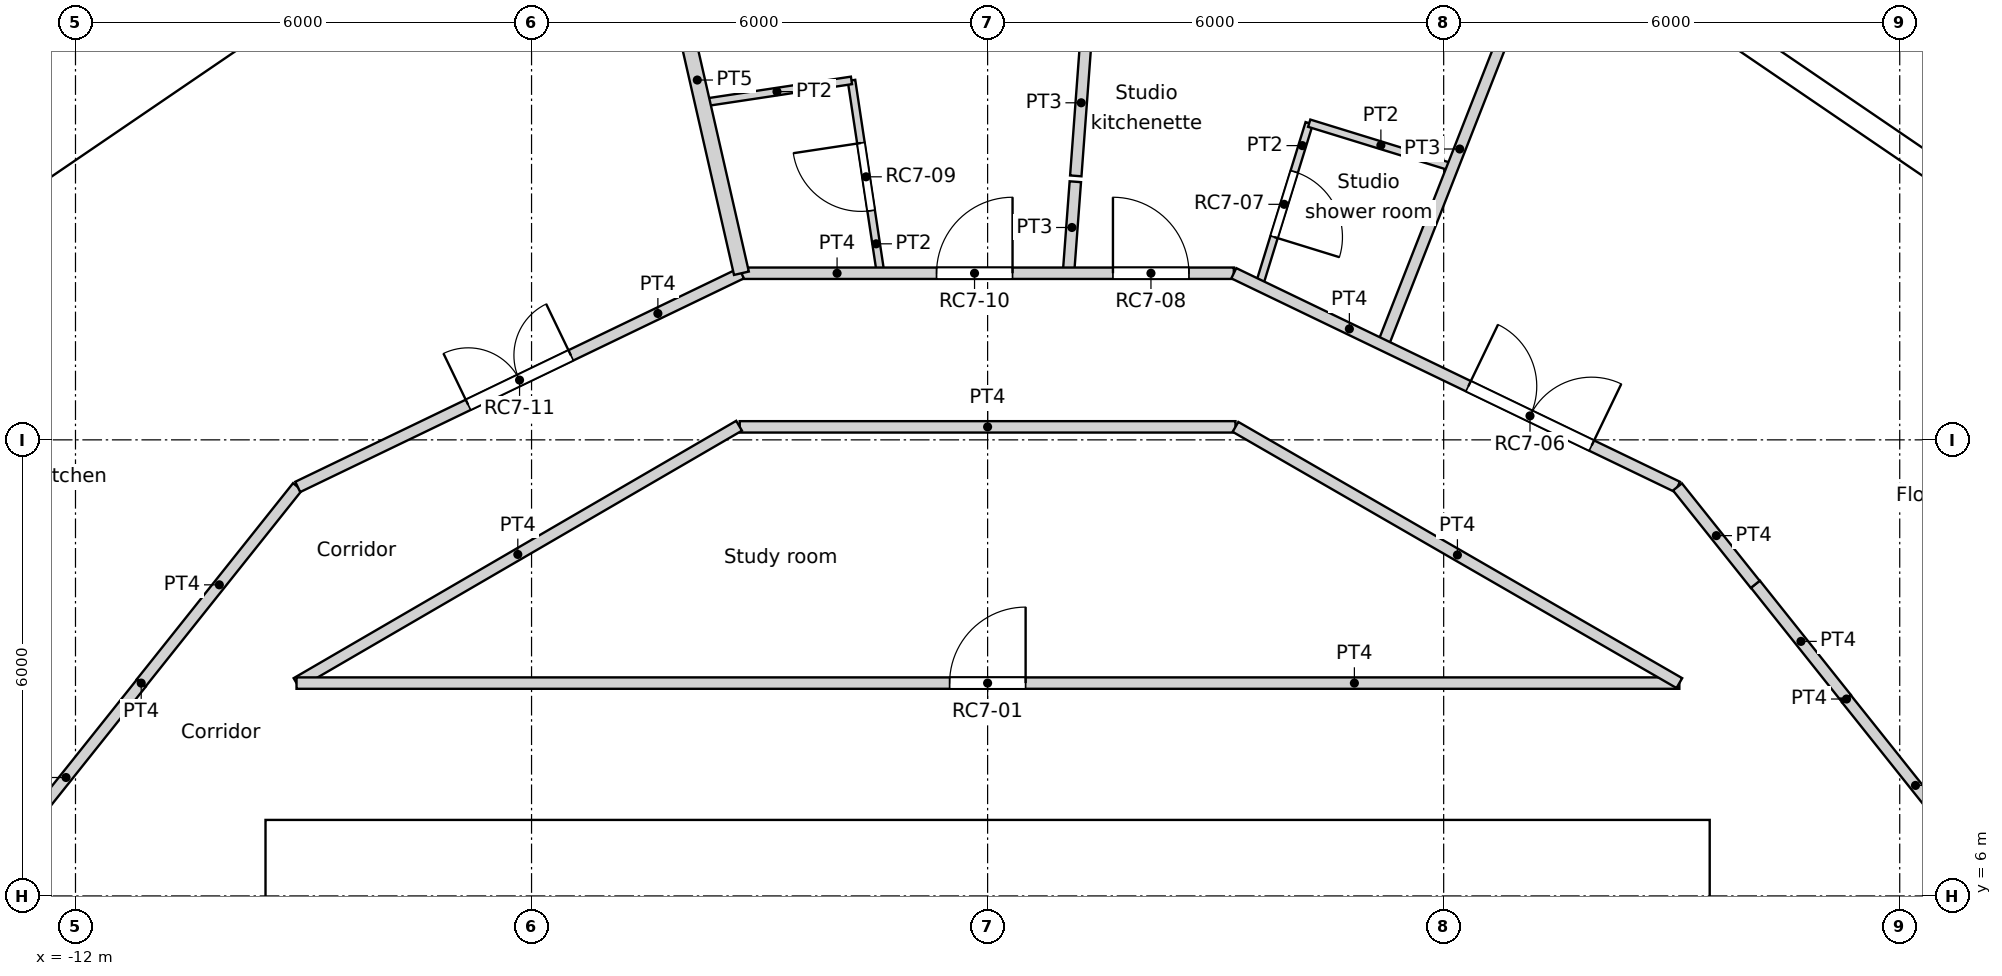
"""IFC4 building model, lengths in metres.
Left out: names, types, materials, properties, quantities, classifications, styles, units other than length and angle.
Written with IfcOpenShell. Run it as: python <this file> out.ifc"""

import sys

from ifc_helpers import new_model, si_unit, direction, frame, frame_2d, origin, origin_2d, place, context, subcontext, project, spatial, rectangle, circle, extrude, element, fill, save


model = new_model("IFC4")
c1 = context("Model", 3, precision=1e-05, world=origin(), true_north=direction((0.0, 1.0)))
c2 = subcontext(c1, "Body", "Model", "MODEL_VIEW")
j1 = project(units=[si_unit("LENGTHUNIT", "METRE"), si_unit("PLANEANGLEUNIT", "RADIAN")], contexts=[c1])
p1 = place(None, origin())
s1 = spatial("IfcSite", under=j1, at=p1, CompositionType="ELEMENT")
p2 = place(p1, origin())
s2 = spatial("IfcBuilding", under=s1, at=p2, CompositionType="ELEMENT")
p3 = place(p2, frame((0.0, 0.0, 294.6)))
s3 = spatial("IfcBuildingStorey", under=s2, at=p3, CompositionType="ELEMENT", Elevation=294.6)
for number, where, z_axis, x_axis in (
    (1, (11.735, 14.716, 0.0), (0.0, 0.0, 1.0), (1.0, 0.0, 0.0)),
    (2, (6.876, 17.521, 0.0), (0.0, 0.0, 1.0), (1.0, 0.0, 0.0)),
    (3, (-9.411, 16.301, 0.0), (0.0, 0.0, 1.0), (1.0, 0.0, 0.0)),
):
    element("IfcColumn", number, at=place(p3, frame(where, z_axis=z_axis, x_axis=x_axis)), inside=s3, PredefinedType="COLUMN", context=c2, shape_type="SweptSolid", body=[
        extrude(circle(Radius=0.45, at=origin_2d()), origin(), (0.0, 0.0, 1.0), 3.6),
    ])
p4 = place(p3, frame((12.408, 15.584, 0.0), z_axis=(0.0, 0.0, 1.0), x_axis=(-0.826236061068, 0.563324037646, 0.0)))
e4 = element("IfcWall", 4, at=p4, inside=s3, PredefinedType="SOLIDWALL", context=c2, shape_type="SweptSolid", body=[
    extrude(rectangle(XDim=2.962, YDim=0.3, at=frame_2d((1.481, 0.0))), origin(), (0.0, 0.0, 1.0), 3.25),
])
p5 = place(p4, frame((1.481, 0.0, 1.55)))
e5 = element("IfcOpeningElement", 5, at=p5, cuts=e4, PredefinedType="OPENING", context=c2, shape_type="SweptSolid", body=[
    extrude(circle(Radius=0.9, at=origin_2d()), frame((0.0, 0.16, 0.0), z_axis=(0.0, -1.0, 0.0), x_axis=(1.0, 0.0, 0.0)), (0.0, 0.0, 1.0), 0.32),
])
p6 = place(p3, frame((-10.275, 17.734, -0.35), z_axis=(0.0, 0.0, 1.0), x_axis=(-0.826246281157, -0.563309047392, 0.0)))
e6 = element("IfcWall", 6, at=p6, inside=s3, PredefinedType="ELEMENTEDWALL", context=c2, shape_type="SweptSolid", body=[
    extrude(rectangle(XDim=3.0, YDim=1.45, at=frame_2d((1.5, 0.0))), origin(), (0.0, 0.0, 1.0), 3.6),
])
p7 = place(p6, frame((1.5, 0.0, 1.9)))
e7 = element("IfcOpeningElement", 7, at=p7, cuts=e6, PredefinedType="OPENING", context=c2, shape_type="SweptSolid", body=[
    extrude(circle(Radius=0.9, at=origin_2d()), frame((0.0, 0.735, 0.0), z_axis=(0.0, -1.0, 0.0), x_axis=(1.0, 0.0, 0.0)), (0.0, 0.0, 1.0), 1.47),
])
p8 = place(p3, frame((-9.5, 6.7, 0.0), z_axis=(0.0, 0.0, 1.0), x_axis=(1.0, 0.0, 0.0)))
e8 = element("IfcWall", 8, at=p8, inside=s3, PredefinedType="SOLIDWALL", context=c2, shape_type="SweptSolid", body=[
    extrude(rectangle(XDim=19.0, YDim=0.6, at=frame_2d((9.5, 0.0))), origin(), (0.0, 0.0, 1.0), 3.6),
])
p9 = place(p8, frame((5.35, 0.0, 0.0)))
e9 = element("IfcOpeningElement", 9, at=p9, cuts=e8, PredefinedType="OPENING", context=c2, shape_type="SweptSolid", body=[
    extrude(rectangle(XDim=1.7, YDim=2.1, at=frame_2d((0.85, 1.05))), frame((0.0, 0.3, 0.0), z_axis=(0.0, -1.0, 0.0), x_axis=(1.0, 0.0, 0.0)), (0.0, 0.0, 1.0), 0.6),
])
p10 = place(p3, frame((-9.2, -6.4, 0.0), z_axis=(0.0, 0.0, 1.0), x_axis=(0.0, 1.0, 0.0)))
e10 = element("IfcWall", 10, at=p10, inside=s3, PredefinedType="SOLIDWALL", context=c2, shape_type="SweptSolid", body=[
    extrude(rectangle(XDim=12.8, YDim=0.6, at=frame_2d((6.4, 0.0))), origin(), (0.0, 0.0, 1.0), 3.6),
])
p11 = place(p3, frame((9.2, -6.4, 0.0), z_axis=(0.0, 0.0, 1.0), x_axis=(0.0, 1.0, 0.0)))
e11 = element("IfcWall", 11, at=p11, inside=s3, PredefinedType="SOLIDWALL", context=c2, shape_type="SweptSolid", body=[
    extrude(rectangle(XDim=12.8, YDim=0.6, at=frame_2d((6.4, 0.0))), origin(), (0.0, 0.0, 1.0), 3.6),
])
p12 = place(p11, frame((6.4, 0.0, 0.0)))
e12 = element("IfcOpeningElement", 12, at=p12, cuts=e11, PredefinedType="OPENING", context=c2, shape_type="SweptSolid", body=[
    extrude(rectangle(XDim=1.8, YDim=2.1, at=frame_2d((0.9, 1.05))), frame((0.0, 0.3, 0.0), z_axis=(0.0, -1.0, 0.0), x_axis=(1.0, 0.0, 0.0)), (0.0, 0.0, 1.0), 0.6),
])
for number, where, z_axis, x_axis in (
    (13, (-2.25, 3.25, 0.0), (0.0, 0.0, 1.0), (0.0, 1.0, 0.0)),
    (14, (0.55, 3.25, 0.0), (0.0, 0.0, 1.0), (0.0, 1.0, 0.0)),
    (15, (3.35, 3.25, 0.0), (0.0, 0.0, 1.0), (0.0, 1.0, 0.0)),
    (16, (6.15, 3.25, 0.0), (0.0, 0.0, 1.0), (0.0, 1.0, 0.0)),
):
    element("IfcWall", number, at=place(p3, frame(where, z_axis=z_axis, x_axis=x_axis)), inside=s3, PredefinedType="SOLIDWALL", context=c2, shape_type="SweptSolid", body=[
        extrude(rectangle(XDim=3.15, YDim=0.3, at=frame_2d((1.575, 0.0))), origin(), (0.0, 0.0, 1.0), 3.25),
    ])
p13 = place(p3, frame((-9.092, 8.8, 0.0), z_axis=(0.0, 0.0, 1.0), x_axis=(0.864470922103, 0.502682827277, 0.0)))
e17 = element("IfcWall", 17, at=p13, inside=s3, PredefinedType="PARTITIONING", context=c2, shape_type="SweptSolid", body=[
    extrude(rectangle(XDim=6.735, YDim=0.15, at=frame_2d((3.368, 0.0))), origin(), (0.0, 0.0, 1.0), 3.25),
])
p14 = place(p3, frame((-9.092, 8.8, 0.0), z_axis=(0.0, 0.0, 1.0), x_axis=(1.0, 0.0, 0.0)))
e18 = element("IfcWall", 18, at=p14, inside=s3, PredefinedType="PARTITIONING", context=c2, shape_type="SweptSolid", body=[
    extrude(rectangle(XDim=18.193, YDim=0.15, at=frame_2d((9.096, 0.0))), origin(), (0.0, 0.0, 1.0), 3.25),
])
p15 = place(p14, frame((8.592, 0.0, 0.0)))
e19 = element("IfcOpeningElement", 19, at=p15, cuts=e18, PredefinedType="OPENING", context=c2, shape_type="SweptSolid", body=[
    extrude(rectangle(XDim=1.0, YDim=2.04, at=frame_2d((0.5, 1.02))), frame((0.0, 0.075, 0.0), z_axis=(0.0, -1.0, 0.0), x_axis=(1.0, 0.0, 0.0)), (0.0, 0.0, 1.0), 0.15),
])
p16 = place(p3, frame((10.101, 10.101, 0.0), z_axis=(0.0, 0.0, 1.0), x_axis=(0.623130947784, -0.782117524362, 0.0)))
e20 = element("IfcWall", 20, at=p16, inside=s3, PredefinedType="PARTITIONING", context=c2, shape_type="SweptSolid", body=[
    extrude(rectangle(XDim=1.924, YDim=0.15, at=frame_2d((0.962, 0.0))), origin(), (0.0, 0.0, 1.0), 3.25),
])
p17 = place(p3, frame((11.3, 8.585, 0.0), z_axis=(0.0, 0.0, 1.0), x_axis=(0.0, 1.0, 0.0)))
e21 = element("IfcWall", 21, at=p17, inside=s3, PredefinedType="PARTITIONING", context=c2, shape_type="SweptSolid", body=[
    extrude(rectangle(XDim=0.011, YDim=0.15, at=frame_2d((0.006, 0.0))), origin(), (0.0, 0.0, 1.0), 3.25),
])
p18 = place(p3, frame((-11.134, 8.8, 0.0), z_axis=(0.0, 0.0, 1.0), x_axis=(-1.0, 0.0, 0.0)))
e22 = element("IfcWall", 22, at=p18, inside=s3, PredefinedType="PARTITIONING", context=c2, shape_type="SweptSolid", body=[
    extrude(rectangle(XDim=0.003, YDim=0.15, at=frame_2d((0.001, 0.0))), origin(), (0.0, 0.0, 1.0), 3.25),
])
p19 = place(p3, frame((-11.136, 8.802, 0.0), z_axis=(0.0, 0.0, 1.0), x_axis=(0.623151397235, 0.782101231379, 0.0)))
e23 = element("IfcWall", 23, at=p19, inside=s3, PredefinedType="PARTITIONING", context=c2, shape_type="SweptSolid", body=[
    extrude(rectangle(XDim=3.301, YDim=0.15, at=frame_2d((1.65, 0.0))), origin(), (0.0, 0.0, 1.0), 3.25),
])
p20 = place(p3, frame((11.3, 8.592, 0.0), z_axis=(0.0, 0.0, 1.0), x_axis=(0.623446514299, -0.781866001185, 0.0)))
e24 = element("IfcWall", 24, at=p20, inside=s3, PredefinedType="PARTITIONING", context=c2, shape_type="SweptSolid", body=[
    extrude(rectangle(XDim=2.911, YDim=0.15, at=frame_2d((1.456, 0.0))), origin(), (0.0, 0.0, 1.0), 3.25),
])
p21 = place(p3, frame((3.261, 12.171, 0.0), z_axis=(0.0, 0.0, 1.0), x_axis=(0.866066809554, -0.499928276245, 0.0)))
e25 = element("IfcWall", 25, at=p21, inside=s3, PredefinedType="PARTITIONING", context=c2, shape_type="SweptSolid", body=[
    extrude(rectangle(XDim=6.743, YDim=0.15, at=frame_2d((3.371, 0.0))), origin(), (0.0, 0.0, 1.0), 3.25),
])
p22 = place(p3, frame((-3.261, 12.171, 0.0), z_axis=(0.0, 0.0, 1.0), x_axis=(1.0, 0.0, 0.0)))
e26 = element("IfcWall", 26, at=p22, inside=s3, PredefinedType="PARTITIONING", context=c2, shape_type="SweptSolid", body=[
    extrude(rectangle(XDim=6.522, YDim=0.15, at=frame_2d((3.261, 0.0))), origin(), (0.0, 0.0, 1.0), 3.25),
])
p23 = place(p3, frame((3.239, 14.192, 0.0), z_axis=(0.0, 0.0, 1.0), x_axis=(0.900976027191, -0.433868872388, 0.0)))
e27 = element("IfcWall", 27, at=p23, inside=s3, PredefinedType="PARTITIONING", context=c2, shape_type="SweptSolid", body=[
    extrude(rectangle(XDim=6.479, YDim=0.15, at=frame_2d((3.239, 0.0))), origin(), (0.0, 0.0, 1.0), 3.25),
])
p24 = place(p23, frame((3.425, 0.0, 0.0)))
e28 = element("IfcOpeningElement", 28, at=p24, cuts=e27, PredefinedType="OPENING", context=c2, shape_type="SweptSolid", body=[
    extrude(rectangle(XDim=1.8, YDim=2.1, at=frame_2d((0.9, 1.05))), frame((0.0, 0.075, 0.0), z_axis=(0.0, -1.0, 0.0), x_axis=(1.0, 0.0, 0.0)), (0.0, 0.0, 1.0), 0.15),
])
p25 = place(p3, frame((9.076, 11.381, 0.0), z_axis=(0.0, 0.0, 1.0), x_axis=(0.623805208652, -0.781579849829, 0.0)))
e29 = element("IfcWall", 29, at=p25, inside=s3, PredefinedType="PARTITIONING", context=c2, shape_type="SweptSolid", body=[
    extrude(rectangle(XDim=1.64, YDim=0.15, at=frame_2d((0.82, 0.0))), origin(), (0.0, 0.0, 1.0), 3.25),
])
p26 = place(p3, frame((-3.239, 14.192, 0.0), z_axis=(0.0, 0.0, 1.0), x_axis=(1.0, 0.0, 0.0)))
e30 = element("IfcWall", 30, at=p26, inside=s3, PredefinedType="PARTITIONING", context=c2, shape_type="SweptSolid", body=[
    extrude(rectangle(XDim=6.478, YDim=0.15, at=frame_2d((3.239, 0.0))), origin(), (0.0, 0.0, 1.0), 3.25),
])
p27 = place(p26, frame((4.888, 0.0, 0.0)))
e31 = element("IfcOpeningElement", 31, at=p27, cuts=e30, PredefinedType="OPENING", context=c2, shape_type="SweptSolid", body=[
    extrude(rectangle(XDim=1.0, YDim=2.1, at=frame_2d((0.5, 1.05))), frame((0.0, 0.075, 0.0), z_axis=(0.0, -1.0, 0.0), x_axis=(1.0, 0.0, 0.0)), (0.0, 0.0, 1.0), 0.15),
])
p28 = place(p26, frame((2.567, 0.0, 0.0)))
e32 = element("IfcOpeningElement", 32, at=p28, cuts=e30, PredefinedType="OPENING", context=c2, shape_type="SweptSolid", body=[
    extrude(rectangle(XDim=1.0, YDim=2.1, at=frame_2d((0.5, 1.05))), frame((0.0, 0.075, 0.0), z_axis=(0.0, -1.0, 0.0), x_axis=(1.0, 0.0, 0.0)), (0.0, 0.0, 1.0), 0.15),
])
p29 = place(p3, frame((-9.076, 11.381, 0.0), z_axis=(0.0, 0.0, 1.0), x_axis=(0.900976027191, 0.433868872388, 0.0)))
e33 = element("IfcWall", 33, at=p29, inside=s3, PredefinedType="PARTITIONING", context=c2, shape_type="SweptSolid", body=[
    extrude(rectangle(XDim=6.479, YDim=0.15, at=frame_2d((3.239, 0.0))), origin(), (0.0, 0.0, 1.0), 3.25),
])
p30 = place(p29, frame((2.489, 0.0, 0.0)))
e34 = element("IfcOpeningElement", 34, at=p30, cuts=e33, PredefinedType="OPENING", context=c2, shape_type="SweptSolid", body=[
    extrude(rectangle(XDim=1.5, YDim=2.1, at=frame_2d((0.75, 1.05))), frame((0.0, 0.075, 0.0), z_axis=(0.0, -1.0, 0.0), x_axis=(1.0, 0.0, 0.0)), (0.0, 0.0, 1.0), 0.15),
])
p31 = place(p3, frame((-13.115, 6.316, 0.0), z_axis=(0.0, 0.0, 1.0), x_axis=(0.623476099415, 0.781842409606, 0.0)))
e35 = element("IfcWall", 35, at=p31, inside=s3, PredefinedType="PARTITIONING", context=c2, shape_type="SweptSolid", body=[
    extrude(rectangle(XDim=3.177, YDim=0.15, at=frame_2d((1.589, 0.0))), origin(), (0.0, 0.0, 1.0), 3.25),
])
p32 = place(p3, frame((5.2, 13.248, 0.0), z_axis=(0.0, 0.0, 1.0), x_axis=(0.365205108582, 0.930927080209, 0.0)))
e36 = element("IfcWall", 36, at=p32, inside=s3, PredefinedType="PARTITIONING", context=c2, shape_type="SweptSolid", body=[
    extrude(rectangle(XDim=5.54, YDim=0.15, at=frame_2d((2.77, 0.0))), origin(), (0.0, 0.0, 1.0), 3.25),
])
p33 = place(p3, frame((4.231, 16.166, 0.0), z_axis=(0.0, 0.0, 1.0), x_axis=(0.955671951668, -0.294433559219, 0.0)))
e37 = element("IfcWall", 37, at=p33, inside=s3, PredefinedType="PARTITIONING", context=c2, shape_type="SweptSolid", body=[
    extrude(rectangle(XDim=1.973, YDim=0.1, at=frame_2d((0.987, 0.0))), origin(), (0.0, 0.0, 1.0), 3.25),
])
p34 = place(p3, frame((3.572, 14.032, 0.0), z_axis=(0.0, 0.0, 1.0), x_axis=(0.295030507093, 0.955487833457, 0.0)))
e38 = element("IfcWall", 38, at=p34, inside=s3, PredefinedType="PARTITIONING", context=c2, shape_type="SweptSolid", body=[
    extrude(rectangle(XDim=2.233, YDim=0.1, at=frame_2d((1.117, 0.0))), origin(), (0.0, 0.0, 1.0), 3.25),
])
p35 = place(p34, frame((0.667, 0.0, 0.0)))
e39 = element("IfcOpeningElement", 39, at=p35, cuts=e38, PredefinedType="OPENING", context=c2, shape_type="SweptSolid", body=[
    extrude(rectangle(XDim=0.9, YDim=2.04, at=frame_2d((0.45, 1.02))), frame((0.0, 0.05, 0.0), z_axis=(0.0, -1.0, 0.0), x_axis=(1.0, 0.0, 0.0)), (0.0, 0.0, 1.0), 0.1),
])
p36 = place(p3, frame((1.064, 14.192, 0.0), z_axis=(0.0, 0.0, 1.0), x_axis=(0.074608991733, 0.997212865116, 0.0)))
e40 = element("IfcWall", 40, at=p36, inside=s3, PredefinedType="PARTITIONING", context=c2, shape_type="SweptSolid", body=[
    extrude(rectangle(XDim=1.208, YDim=0.15, at=frame_2d((0.604, 0.0))), origin(), (0.0, 0.0, 1.0), 3.25),
])
p37 = place(p3, frame((1.16, 15.473, 0.0), z_axis=(0.0, 0.0, 1.0), x_axis=(0.074188791375, 0.99724421444, 0.0)))
e41 = element("IfcWall", 41, at=p37, inside=s3, PredefinedType="PARTITIONING", context=c2, shape_type="SweptSolid", body=[
    extrude(rectangle(XDim=1.928, YDim=0.15, at=frame_2d((0.964, 0.0))), origin(), (0.0, 0.0, 1.0), 3.25),
])
p38 = place(p3, frame((-1.791, 16.729, 0.0), z_axis=(0.0, 0.0, 1.0), x_axis=(0.149289553133, -0.988793522089, 0.0)))
e42 = element("IfcWall", 42, at=p38, inside=s3, PredefinedType="PARTITIONING", context=c2, shape_type="SweptSolid", body=[
    extrude(rectangle(XDim=2.566, YDim=0.1, at=frame_2d((1.283, 0.0))), origin(), (0.0, 0.0, 1.0), 3.25),
])
p39 = place(p38, frame((0.833, 0.0, 0.0)))
e43 = element("IfcOpeningElement", 43, at=p39, cuts=e42, PredefinedType="OPENING", context=c2, shape_type="SweptSolid", body=[
    extrude(rectangle(XDim=0.9, YDim=2.04, at=frame_2d((0.45, 1.02))), frame((0.0, 0.05, 0.0), z_axis=(0.0, -1.0, 0.0), x_axis=(1.0, 0.0, 0.0)), (0.0, 0.0, 1.0), 0.1),
])
p40 = place(p3, frame((-3.751, 16.434, 0.0), z_axis=(0.0, 0.0, 1.0), x_axis=(0.988867580828, 0.148798210967, 0.0)))
e44 = element("IfcWall", 44, at=p40, inside=s3, PredefinedType="PARTITIONING", context=c2, shape_type="SweptSolid", body=[
    extrude(rectangle(XDim=1.982, YDim=0.1, at=frame_2d((0.991, 0.0))), origin(), (0.0, 0.0, 1.0), 3.25),
])
p41 = place(p3, frame((-4.4, 19.276, 0.0), z_axis=(0.0, 0.0, 1.0), x_axis=(0.222612505682, -0.974907007008, 0.0)))
e45 = element("IfcWall", 45, at=p41, inside=s3, PredefinedType="PARTITIONING", context=c2, shape_type="SweptSolid", body=[
    extrude(rectangle(XDim=5.215, YDim=0.2, at=frame_2d((2.607, 0.0))), origin(), (0.0, 0.0, 1.0), 3.25),
])
p42 = place(p5, origin())
e46 = element("IfcWindow", 46, at=p42, inside=s3, PartitioningType="SINGLE_PANEL", PredefinedType="WINDOW", context=c2, shape_type="SweptSolid", body=[
    extrude(circle(Radius=0.9, at=origin_2d()), frame((0.0, 0.12, 0.0), z_axis=(0.0, -1.0, 0.0), x_axis=(1.0, 0.0, 0.0)), (0.0, 0.0, 1.0), 0.1),
])
fill(e5, e46)
p43 = place(p7, origin())
e47 = element("IfcWindow", 47, at=p43, inside=s3, PartitioningType="SINGLE_PANEL", PredefinedType="WINDOW", context=c2, shape_type="SweptSolid", body=[
    extrude(circle(Radius=0.9, at=origin_2d()), frame((0.0, 0.695, 0.0), z_axis=(0.0, -1.0, 0.0), x_axis=(1.0, 0.0, 0.0)), (0.0, 0.0, 1.0), 0.1),
])
fill(e7, e47)
p44 = place(p9, origin())
e48 = element("IfcDoor", 48, at=p44, inside=s3, OperationType="DOUBLE_DOOR_SINGLE_SWING", PredefinedType="DOOR", context=c2, shape_type="SweptSolid", body=[
    extrude(rectangle(XDim=1.7, YDim=2.1, at=frame_2d((0.85, 1.05))), frame((0.0, 0.025, 0.0), z_axis=(0.0, -1.0, 0.0), x_axis=(1.0, 0.0, 0.0)), (0.0, 0.0, 1.0), 0.05),
])
fill(e9, e48)
p45 = place(p15, origin())
e49 = element("IfcDoor", 49, at=p45, inside=s3, OperationType="SINGLE_SWING_RIGHT", PredefinedType="DOOR", context=c2, shape_type="SweptSolid", body=[
    extrude(rectangle(XDim=1.0, YDim=2.04, at=frame_2d((0.5, 1.02))), frame((0.0, 0.025, 0.0), z_axis=(0.0, -1.0, 0.0), x_axis=(1.0, 0.0, 0.0)), (0.0, 0.0, 1.0), 0.05),
])
fill(e19, e49)
p46 = place(p24, origin())
e50 = element("IfcDoor", 50, at=p46, inside=s3, OperationType="DOUBLE_DOOR_SINGLE_SWING", PredefinedType="DOOR", context=c2, shape_type="SweptSolid", body=[
    extrude(rectangle(XDim=1.8, YDim=2.1, at=frame_2d((0.9, 1.05))), frame((0.0, 0.025, 0.0), z_axis=(0.0, -1.0, 0.0), x_axis=(1.0, 0.0, 0.0)), (0.0, 0.0, 1.0), 0.05),
])
fill(e28, e50)
p47 = place(p35, origin())
e51 = element("IfcDoor", 51, at=p47, inside=s3, OperationType="SINGLE_SWING_RIGHT", PredefinedType="DOOR", context=c2, shape_type="SweptSolid", body=[
    extrude(rectangle(XDim=0.9, YDim=2.04, at=frame_2d((0.45, 1.02))), frame((0.0, 0.025, 0.0), z_axis=(0.0, -1.0, 0.0), x_axis=(1.0, 0.0, 0.0)), (0.0, 0.0, 1.0), 0.05),
])
fill(e39, e51)
p48 = place(p27, origin())
e52 = element("IfcDoor", 52, at=p48, inside=s3, OperationType="SINGLE_SWING_LEFT", PredefinedType="DOOR", context=c2, shape_type="SweptSolid", body=[
    extrude(rectangle(XDim=1.0, YDim=2.1, at=frame_2d((0.5, 1.05))), frame((0.0, 0.025, 0.0), z_axis=(0.0, -1.0, 0.0), x_axis=(1.0, 0.0, 0.0)), (0.0, 0.0, 1.0), 0.05),
])
fill(e31, e52)
p49 = place(p39, origin())
e53 = element("IfcDoor", 53, at=p49, inside=s3, OperationType="SINGLE_SWING_RIGHT", PredefinedType="DOOR", context=c2, shape_type="SweptSolid", body=[
    extrude(rectangle(XDim=0.9, YDim=2.04, at=frame_2d((0.45, 1.02))), frame((0.0, 0.025, 0.0), z_axis=(0.0, -1.0, 0.0), x_axis=(1.0, 0.0, 0.0)), (0.0, 0.0, 1.0), 0.05),
])
fill(e43, e53)
p50 = place(p28, origin())
e54 = element("IfcDoor", 54, at=p50, inside=s3, OperationType="SINGLE_SWING_RIGHT", PredefinedType="DOOR", context=c2, shape_type="SweptSolid", body=[
    extrude(rectangle(XDim=1.0, YDim=2.1, at=frame_2d((0.5, 1.05))), frame((0.0, 0.025, 0.0), z_axis=(0.0, -1.0, 0.0), x_axis=(1.0, 0.0, 0.0)), (0.0, 0.0, 1.0), 0.05),
])
fill(e32, e54)
p51 = place(p30, origin())
e55 = element("IfcDoor", 55, at=p51, inside=s3, OperationType="DOUBLE_DOOR_SINGLE_SWING", PredefinedType="DOOR", context=c2, shape_type="SweptSolid", body=[
    extrude(rectangle(XDim=1.5, YDim=2.1, at=frame_2d((0.75, 1.05))), frame((0.0, 0.025, 0.0), z_axis=(0.0, -1.0, 0.0), x_axis=(1.0, 0.0, 0.0)), (0.0, 0.0, 1.0), 0.05),
])
fill(e34, e55)
save(model, sys.argv[1])
